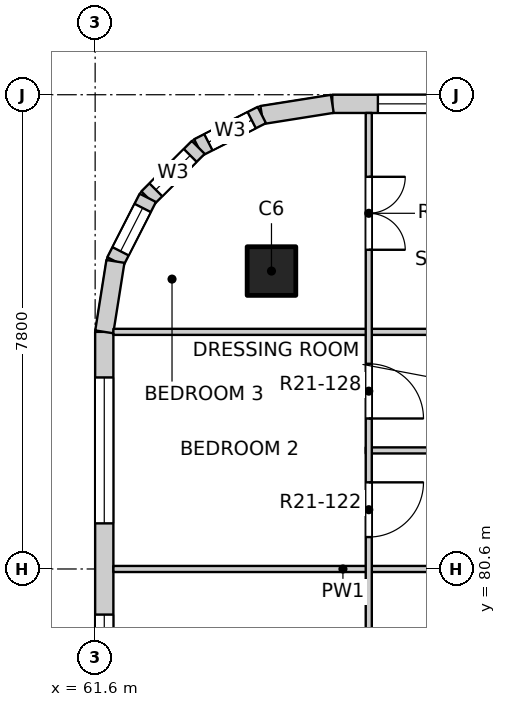
"""IFC4 building model, lengths in metres.
Left out: names, types, materials, properties, quantities, classifications, styles, units other than length and angle.
Written with IfcOpenShell. Run it as: python <this file> out.ifc"""

import sys

from ifc_helpers import new_model, si_unit, direction, frame, frame_2d, origin, origin_2d, place, context, subcontext, project, spatial, rectangle, extrude, element, fill, save


model = new_model("IFC4")
c1 = context("Model", 3, precision=1e-05, world=origin(), true_north=direction((0.0, 1.0)))
c2 = subcontext(c1, "Body", "Model", "MODEL_VIEW")
j1 = project(units=[si_unit("LENGTHUNIT", "METRE"), si_unit("PLANEANGLEUNIT", "RADIAN")], contexts=[c1])
p1 = place(None, origin())
s1 = spatial("IfcSite", under=j1, at=p1, CompositionType="ELEMENT")
p2 = place(p1, origin())
s2 = spatial("IfcBuilding", under=s1, at=p2, CompositionType="ELEMENT")
p3 = place(p2, frame((0.0, 0.0, 214.3)))
s3 = spatial("IfcBuildingStorey", under=s2, at=p3, CompositionType="ELEMENT", Elevation=214.3)
p4 = place(p3, frame((64.5, 85.5, -0.25), z_axis=(0.0, 0.0, 1.0), x_axis=(1.0, 0.0, 0.0)))
e1 = element("IfcColumn", 1, at=p4, inside=s3, PredefinedType="COLUMN", context=c2, shape_type="SweptSolid", body=[
    extrude(rectangle(XDim=0.8, YDim=0.8, at=origin_2d()), origin(), (0.0, 0.0, 1.0), 3.4),
])
p5 = place(p3, frame((65.5, 88.25, 0.0), z_axis=(0.0, 0.0, 1.0), x_axis=(1.0, 0.0, 0.0)))
e2 = element("IfcWall", 2, at=p5, inside=s3, PredefinedType="SOLIDWALL", context=c2, shape_type="SweptSolid", body=[
    extrude(rectangle(XDim=7.4, YDim=0.3, at=frame_2d((3.7, 0.0))), origin(), (0.0, 0.0, 1.0), 2.7),
])
p6 = place(p5, frame((0.75, 0.0, 0.9)))
e3 = element("IfcOpeningElement", 3, at=p6, cuts=e2, PredefinedType="OPENING", context=c2, shape_type="SweptSolid", body=[
    extrude(rectangle(XDim=2.4, YDim=1.8, at=frame_2d((1.2, 0.9))), frame((0.0, 0.16, 0.0), z_axis=(0.0, -1.0, 0.0), x_axis=(1.0, 0.0, 0.0)), (0.0, 0.0, 1.0), 0.32),
])
p7 = place(p5, frame((4.65, 0.0, 0.9)))
e4 = element("IfcOpeningElement", 4, at=p7, cuts=e2, PredefinedType="OPENING", context=c2, shape_type="SweptSolid", body=[
    extrude(rectangle(XDim=2.4, YDim=1.8, at=frame_2d((1.2, 0.9))), frame((0.0, 0.16, 0.0), z_axis=(0.0, -1.0, 0.0), x_axis=(1.0, 0.0, 0.0)), (0.0, 0.0, 1.0), 0.32),
])
p8 = place(p3, frame((61.75, 77.1, 0.0), z_axis=(0.0, 0.0, 1.0), x_axis=(0.0, 1.0, 0.0)))
e5 = element("IfcWall", 5, at=p8, inside=s3, PredefinedType="SOLIDWALL", context=c2, shape_type="SweptSolid", body=[
    extrude(rectangle(XDim=7.4, YDim=0.3, at=frame_2d((3.7, 0.0))), origin(), (0.0, 0.0, 1.0), 2.7),
])
p9 = place(p8, frame((0.35, 0.0, 0.9)))
e6 = element("IfcOpeningElement", 6, at=p9, cuts=e5, PredefinedType="OPENING", context=c2, shape_type="SweptSolid", body=[
    extrude(rectangle(XDim=2.4, YDim=1.8, at=frame_2d((1.2, 0.9))), frame((0.0, 0.16, 0.0), z_axis=(0.0, -1.0, 0.0), x_axis=(1.0, 0.0, 0.0)), (0.0, 0.0, 1.0), 0.32),
])
p10 = place(p8, frame((4.25, 0.0, 0.9)))
e7 = element("IfcOpeningElement", 7, at=p10, cuts=e5, PredefinedType="OPENING", context=c2, shape_type="SweptSolid", body=[
    extrude(rectangle(XDim=2.4, YDim=1.8, at=frame_2d((1.2, 0.9))), frame((0.0, 0.16, 0.0), z_axis=(0.0, -1.0, 0.0), x_axis=(1.0, 0.0, 0.0)), (0.0, 0.0, 1.0), 0.32),
])
p11 = place(p3, frame((65.5, 88.25, 0.0), z_axis=(0.0, 0.0, 1.0), x_axis=(-0.987678452879, -0.156496880861, 0.0)))
e8 = element("IfcWall", 8, at=p11, inside=s3, PredefinedType="SOLIDWALL", context=c2, shape_type="SweptSolid", body=[
    extrude(rectangle(XDim=1.173, YDim=0.3, at=frame_2d((0.586, 0.0))), origin(), (0.0, 0.0, 1.0), 2.7),
])
p12 = place(p3, frame((64.341, 88.066, 0.0), z_axis=(0.0, 0.0, 1.0), x_axis=(-0.890988677504, -0.454025524128, 0.0)))
e9 = element("IfcWall", 9, at=p12, inside=s3, PredefinedType="SOLIDWALL", context=c2, shape_type="SweptSolid", body=[
    extrude(rectangle(XDim=1.173, YDim=0.3, at=frame_2d((0.587, 0.0))), origin(), (0.0, 0.0, 1.0), 2.7),
])
p13 = place(p12, frame((0.187, 0.0, 0.9)))
e10 = element("IfcOpeningElement", 10, at=p13, cuts=e9, PredefinedType="OPENING", context=c2, shape_type="SweptSolid", body=[
    extrude(rectangle(XDim=0.8, YDim=1.2, at=frame_2d((0.4, 0.6))), frame((0.0, 0.16, 0.0), z_axis=(0.0, -1.0, 0.0), x_axis=(1.0, 0.0, 0.0)), (0.0, 0.0, 1.0), 0.32),
])
p14 = place(p3, frame((63.296, 87.534, 0.0), z_axis=(0.0, 0.0, 1.0), x_axis=(-0.707106781187, -0.707106781187, 0.0)))
e11 = element("IfcWall", 11, at=p14, inside=s3, PredefinedType="SOLIDWALL", context=c2, shape_type="SweptSolid", body=[
    extrude(rectangle(XDim=1.173, YDim=0.3, at=frame_2d((0.586, 0.0))), origin(), (0.0, 0.0, 1.0), 2.7),
])
p15 = place(p14, frame((0.187, 0.0, 0.9)))
e12 = element("IfcOpeningElement", 12, at=p15, cuts=e11, PredefinedType="OPENING", context=c2, shape_type="SweptSolid", body=[
    extrude(rectangle(XDim=0.8, YDim=1.2, at=frame_2d((0.4, 0.6))), frame((0.0, 0.16, 0.0), z_axis=(0.0, -1.0, 0.0), x_axis=(1.0, 0.0, 0.0)), (0.0, 0.0, 1.0), 0.32),
])
p16 = place(p3, frame((62.466, 86.704, 0.0), z_axis=(0.0, 0.0, 1.0), x_axis=(-0.454025524128, -0.890988677504, 0.0)))
e13 = element("IfcWall", 13, at=p16, inside=s3, PredefinedType="SOLIDWALL", context=c2, shape_type="SweptSolid", body=[
    extrude(rectangle(XDim=1.173, YDim=0.3, at=frame_2d((0.587, 0.0))), origin(), (0.0, 0.0, 1.0), 2.7),
])
p17 = place(p16, frame((0.187, 0.0, 0.9)))
e14 = element("IfcOpeningElement", 14, at=p17, cuts=e13, PredefinedType="OPENING", context=c2, shape_type="SweptSolid", body=[
    extrude(rectangle(XDim=0.8, YDim=1.2, at=frame_2d((0.4, 0.6))), frame((0.0, 0.16, 0.0), z_axis=(0.0, -1.0, 0.0), x_axis=(1.0, 0.0, 0.0)), (0.0, 0.0, 1.0), 0.32),
])
p18 = place(p3, frame((61.934, 85.659, 0.0), z_axis=(0.0, 0.0, 1.0), x_axis=(-0.156496880861, -0.987678452879, 0.0)))
e15 = element("IfcWall", 15, at=p18, inside=s3, PredefinedType="SOLIDWALL", context=c2, shape_type="SweptSolid", body=[
    extrude(rectangle(XDim=1.173, YDim=0.3, at=frame_2d((0.586, 0.0))), origin(), (0.0, 0.0, 1.0), 2.7),
])
p19 = place(p3, frame((61.9, 80.6, 0.0), z_axis=(0.0, 0.0, 1.0), x_axis=(1.0, 0.0, 0.0)))
e16 = element("IfcWall", 16, at=p19, inside=s3, PredefinedType="PARTITIONING", context=c2, shape_type="SweptSolid", body=[
    extrude(rectangle(XDim=7.55, YDim=0.1, at=frame_2d((3.775, 0.0))), origin(), (0.0, 0.0, 1.0), 3.15),
])
p20 = place(p3, frame((66.05, 82.55, 0.0), z_axis=(0.0, 0.0, 1.0), x_axis=(1.0, 0.0, 0.0)))
e17 = element("IfcWall", 17, at=p20, inside=s3, PredefinedType="PARTITIONING", context=c2, shape_type="SweptSolid", body=[
    extrude(rectangle(XDim=3.4, YDim=0.1, at=frame_2d((1.7, 0.0))), origin(), (0.0, 0.0, 1.0), 3.15),
])
p21 = place(p3, frame((61.9, 84.5, 0.0), z_axis=(0.0, 0.0, 1.0), x_axis=(1.0, 0.0, 0.0)))
e18 = element("IfcWall", 18, at=p21, inside=s3, PredefinedType="PARTITIONING", context=c2, shape_type="SweptSolid", body=[
    extrude(rectangle(XDim=11.5, YDim=0.1, at=frame_2d((5.75, 0.0))), origin(), (0.0, 0.0, 1.0), 3.15),
])
p22 = place(p21, frame((7.965, 0.0, 0.0)))
e19 = element("IfcOpeningElement", 19, at=p22, cuts=e18, PredefinedType="OPENING", context=c2, shape_type="SweptSolid", body=[
    extrude(rectangle(XDim=0.9, YDim=2.1, at=frame_2d((0.45, 1.05))), frame((0.0, 0.06, 0.0), z_axis=(0.0, -1.0, 0.0), x_axis=(1.0, 0.0, 0.0)), (0.0, 0.0, 1.0), 0.12),
])
p23 = place(p3, frame((66.1, 61.2, 0.0), z_axis=(0.0, 0.0, 1.0), x_axis=(0.0, 1.0, 0.0)))
e20 = element("IfcWall", 20, at=p23, inside=s3, PredefinedType="PARTITIONING", context=c2, shape_type="SweptSolid", body=[
    extrude(rectangle(XDim=26.9, YDim=0.1, at=frame_2d((13.45, 0.0))), origin(), (0.0, 0.0, 1.0), 3.15),
])
p24 = place(p23, frame((1.25, 0.0, 0.0)))
e21 = element("IfcOpeningElement", 21, at=p24, cuts=e20, PredefinedType="OPENING", context=c2, shape_type="SweptSolid", body=[
    extrude(rectangle(XDim=1.2, YDim=2.1, at=frame_2d((0.6, 1.05))), frame((0.0, 0.06, 0.0), z_axis=(0.0, -1.0, 0.0), x_axis=(1.0, 0.0, 0.0)), (0.0, 0.0, 1.0), 0.12),
])
p25 = place(p23, frame((5.15, 0.0, 0.0)))
e22 = element("IfcOpeningElement", 22, at=p25, cuts=e20, PredefinedType="OPENING", context=c2, shape_type="SweptSolid", body=[
    extrude(rectangle(XDim=1.2, YDim=2.1, at=frame_2d((0.6, 1.05))), frame((0.0, 0.06, 0.0), z_axis=(0.0, -1.0, 0.0), x_axis=(1.0, 0.0, 0.0)), (0.0, 0.0, 1.0), 0.12),
])
p26 = place(p23, frame((8.225, 0.0, 0.0)))
e23 = element("IfcOpeningElement", 23, at=p26, cuts=e20, PredefinedType="OPENING", context=c2, shape_type="SweptSolid", body=[
    extrude(rectangle(XDim=0.9, YDim=2.1, at=frame_2d((0.45, 1.05))), frame((0.0, 0.06, 0.0), z_axis=(0.0, -1.0, 0.0), x_axis=(1.0, 0.0, 0.0)), (0.0, 0.0, 1.0), 0.12),
])
p27 = place(p23, frame((10.175, 0.0, 0.0)))
e24 = element("IfcOpeningElement", 24, at=p27, cuts=e20, PredefinedType="OPENING", context=c2, shape_type="SweptSolid", body=[
    extrude(rectangle(XDim=0.9, YDim=2.1, at=frame_2d((0.45, 1.05))), frame((0.0, 0.06, 0.0), z_axis=(0.0, -1.0, 0.0), x_axis=(1.0, 0.0, 0.0)), (0.0, 0.0, 1.0), 0.12),
])
p28 = place(p23, frame((12.125, 0.0, 0.0)))
e25 = element("IfcOpeningElement", 25, at=p28, cuts=e20, PredefinedType="OPENING", context=c2, shape_type="SweptSolid", body=[
    extrude(rectangle(XDim=0.9, YDim=2.1, at=frame_2d((0.45, 1.05))), frame((0.0, 0.06, 0.0), z_axis=(0.0, -1.0, 0.0), x_axis=(1.0, 0.0, 0.0)), (0.0, 0.0, 1.0), 0.12),
])
p29 = place(p23, frame((14.075, 0.0, 0.0)))
e26 = element("IfcOpeningElement", 26, at=p29, cuts=e20, PredefinedType="OPENING", context=c2, shape_type="SweptSolid", body=[
    extrude(rectangle(XDim=0.9, YDim=2.1, at=frame_2d((0.45, 1.05))), frame((0.0, 0.06, 0.0), z_axis=(0.0, -1.0, 0.0), x_axis=(1.0, 0.0, 0.0)), (0.0, 0.0, 1.0), 0.12),
])
p30 = place(p23, frame((16.85, 0.0, 0.0)))
e27 = element("IfcOpeningElement", 27, at=p30, cuts=e20, PredefinedType="OPENING", context=c2, shape_type="SweptSolid", body=[
    extrude(rectangle(XDim=1.2, YDim=2.1, at=frame_2d((0.6, 1.05))), frame((0.0, 0.06, 0.0), z_axis=(0.0, -1.0, 0.0), x_axis=(1.0, 0.0, 0.0)), (0.0, 0.0, 1.0), 0.12),
])
p31 = place(p23, frame((19.925, 0.0, 0.0)))
e28 = element("IfcOpeningElement", 28, at=p31, cuts=e20, PredefinedType="OPENING", context=c2, shape_type="SweptSolid", body=[
    extrude(rectangle(XDim=0.9, YDim=2.1, at=frame_2d((0.45, 1.05))), frame((0.0, 0.06, 0.0), z_axis=(0.0, -1.0, 0.0), x_axis=(1.0, 0.0, 0.0)), (0.0, 0.0, 1.0), 0.12),
])
p32 = place(p23, frame((21.875, 0.0, 0.0)))
e29 = element("IfcOpeningElement", 29, at=p32, cuts=e20, PredefinedType="OPENING", context=c2, shape_type="SweptSolid", body=[
    extrude(rectangle(XDim=0.9, YDim=2.1, at=frame_2d((0.45, 1.05))), frame((0.0, 0.06, 0.0), z_axis=(0.0, -1.0, 0.0), x_axis=(1.0, 0.0, 0.0)), (0.0, 0.0, 1.0), 0.12),
])
p33 = place(p23, frame((24.65, 0.0, 0.0)))
e30 = element("IfcOpeningElement", 30, at=p33, cuts=e20, PredefinedType="OPENING", context=c2, shape_type="SweptSolid", body=[
    extrude(rectangle(XDim=1.2, YDim=2.1, at=frame_2d((0.6, 1.05))), frame((0.0, 0.06, 0.0), z_axis=(0.0, -1.0, 0.0), x_axis=(1.0, 0.0, 0.0)), (0.0, 0.0, 1.0), 0.12),
])
p34 = place(p6, origin())
e31 = element("IfcWindow", 31, at=p34, inside=s3, PartitioningType="DOUBLE_PANEL_VERTICAL", PredefinedType="WINDOW", context=c2, shape_type="SweptSolid", body=[
    extrude(rectangle(XDim=2.4, YDim=1.8, at=frame_2d((1.2, 0.9))), frame((0.0, 0.03, 0.0), z_axis=(0.0, -1.0, 0.0), x_axis=(1.0, 0.0, 0.0)), (0.0, 0.0, 1.0), 0.06),
])
fill(e3, e31)
p35 = place(p9, origin())
e32 = element("IfcWindow", 32, at=p35, inside=s3, PartitioningType="DOUBLE_PANEL_VERTICAL", PredefinedType="WINDOW", context=c2, shape_type="SweptSolid", body=[
    extrude(rectangle(XDim=2.4, YDim=1.8, at=frame_2d((1.2, 0.9))), frame((0.0, 0.03, 0.0), z_axis=(0.0, -1.0, 0.0), x_axis=(1.0, 0.0, 0.0)), (0.0, 0.0, 1.0), 0.06),
])
fill(e6, e32)
p36 = place(p10, origin())
e33 = element("IfcWindow", 33, at=p36, inside=s3, PartitioningType="DOUBLE_PANEL_VERTICAL", PredefinedType="WINDOW", context=c2, shape_type="SweptSolid", body=[
    extrude(rectangle(XDim=2.4, YDim=1.8, at=frame_2d((1.2, 0.9))), frame((0.0, 0.03, 0.0), z_axis=(0.0, -1.0, 0.0), x_axis=(1.0, 0.0, 0.0)), (0.0, 0.0, 1.0), 0.06),
])
fill(e7, e33)
p37 = place(p13, origin())
e34 = element("IfcWindow", 34, at=p37, inside=s3, PartitioningType="SINGLE_PANEL", PredefinedType="WINDOW", context=c2, shape_type="SweptSolid", body=[
    extrude(rectangle(XDim=0.8, YDim=1.2, at=frame_2d((0.4, 0.6))), frame((0.0, 0.03, 0.0), z_axis=(0.0, -1.0, 0.0), x_axis=(1.0, 0.0, 0.0)), (0.0, 0.0, 1.0), 0.06),
])
fill(e10, e34)
p38 = place(p15, origin())
e35 = element("IfcWindow", 35, at=p38, inside=s3, PartitioningType="SINGLE_PANEL", PredefinedType="WINDOW", context=c2, shape_type="SweptSolid", body=[
    extrude(rectangle(XDim=0.8, YDim=1.2, at=frame_2d((0.4, 0.6))), frame((0.0, 0.03, 0.0), z_axis=(0.0, -1.0, 0.0), x_axis=(1.0, 0.0, 0.0)), (0.0, 0.0, 1.0), 0.06),
])
fill(e12, e35)
p39 = place(p17, origin())
e36 = element("IfcWindow", 36, at=p39, inside=s3, PartitioningType="SINGLE_PANEL", PredefinedType="WINDOW", context=c2, shape_type="SweptSolid", body=[
    extrude(rectangle(XDim=0.8, YDim=1.2, at=frame_2d((0.4, 0.6))), frame((0.0, 0.03, 0.0), z_axis=(0.0, -1.0, 0.0), x_axis=(1.0, 0.0, 0.0)), (0.0, 0.0, 1.0), 0.06),
])
fill(e14, e36)
p40 = place(p31, origin())
e37 = element("IfcDoor", 37, at=p40, inside=s3, OperationType="SINGLE_SWING_LEFT", PredefinedType="DOOR", context=c2, shape_type="SweptSolid", body=[
    extrude(rectangle(XDim=0.9, YDim=2.1, at=frame_2d((0.45, 1.05))), frame((0.0, 0.025, 0.0), z_axis=(0.0, -1.0, 0.0), x_axis=(1.0, 0.0, 0.0)), (0.0, 0.0, 1.0), 0.05),
])
fill(e28, e37)
p41 = place(p32, origin())
e38 = element("IfcDoor", 38, at=p41, inside=s3, OperationType="SINGLE_SWING_RIGHT", PredefinedType="DOOR", context=c2, shape_type="SweptSolid", body=[
    extrude(rectangle(XDim=0.9, YDim=2.1, at=frame_2d((0.45, 1.05))), frame((0.0, 0.025, 0.0), z_axis=(0.0, -1.0, 0.0), x_axis=(1.0, 0.0, 0.0)), (0.0, 0.0, 1.0), 0.05),
])
fill(e29, e38)
p42 = place(p33, origin())
e39 = element("IfcDoor", 39, at=p42, inside=s3, OperationType="DOUBLE_DOOR_SINGLE_SWING", PredefinedType="DOOR", context=c2, shape_type="SweptSolid", body=[
    extrude(rectangle(XDim=1.2, YDim=2.1, at=frame_2d((0.6, 1.05))), frame((0.0, 0.025, 0.0), z_axis=(0.0, -1.0, 0.0), x_axis=(1.0, 0.0, 0.0)), (0.0, 0.0, 1.0), 0.05),
])
fill(e30, e39)
save(model, sys.argv[1])
